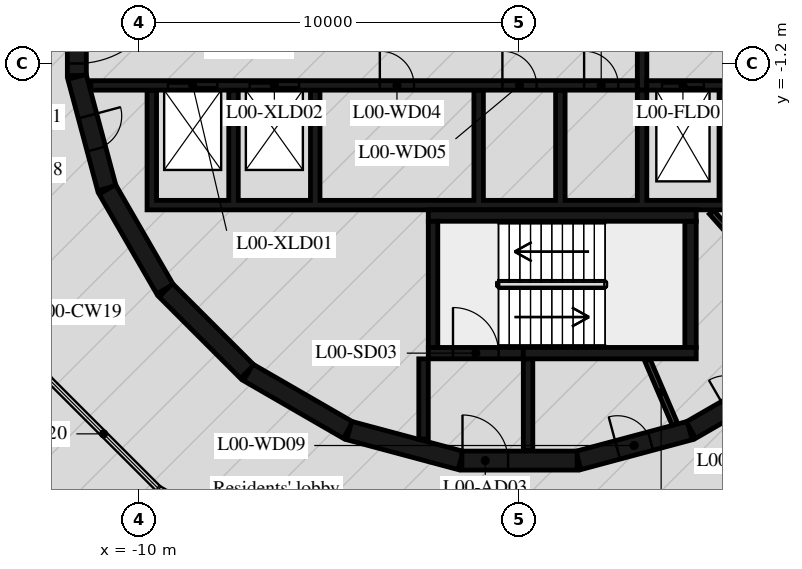
"""IFC4 building model, lengths in metres.
Left out: names, types, materials, properties, quantities, classifications, styles, units other than length and angle.
Written with IfcOpenShell. Run it as: python <this file> out.ifc"""

import sys

from ifc_helpers import new_model, si_unit, direction, frame, frame_2d, origin, place, context, subcontext, project, spatial, polyline, rectangle, outline, extrude, element, fill, save


model = new_model("IFC4")
c1 = context("Model", 3, precision=1e-05, world=origin(), true_north=direction((0.0, 1.0)))
c2 = subcontext(c1, "Body", "Model", "MODEL_VIEW")
j1 = project(units=[si_unit("LENGTHUNIT", "METRE"), si_unit("PLANEANGLEUNIT", "RADIAN")], contexts=[c1])
p1 = place(None, origin())
s1 = spatial("IfcSite", under=j1, at=p1, CompositionType="ELEMENT")
p2 = place(p1, origin())
s2 = spatial("IfcBuilding", under=s1, at=p2, CompositionType="ELEMENT")
p3 = place(p2, origin())
s3 = spatial("IfcBuildingStorey", under=s2, at=p3, CompositionType="ELEMENT", Elevation=0.0)
p4 = place(p3, frame((1.55, -11.643, 0.0), z_axis=(0.0, 0.0, 1.0), x_axis=(0.965948410781, 0.258734743916, 0.0)))
e1 = element("IfcWall", 1, at=p4, inside=s3, PredefinedType="SHEAR", context=c2, shape_type="SweptSolid", body=[
    extrude(rectangle(XDim=3.033, YDim=0.5, at=frame_2d((1.516, 0.0))), origin(), (0.0, 0.0, 1.0), 8.62),
])
p5 = place(p4, frame((1.066, 0.0, 0.0)))
e2 = element("IfcOpeningElement", 2, at=p5, cuts=e1, PredefinedType="OPENING", context=c2, shape_type="SweptSolid", body=[
    extrude(rectangle(XDim=0.9, YDim=2.1, at=frame_2d((0.45, 1.05))), frame((0.0, 0.26, 0.0), z_axis=(0.0, -1.0, 0.0), x_axis=(1.0, 0.0, 0.0)), (0.0, 0.0, 1.0), 0.52),
])
p6 = place(p3, frame((4.51, -10.845, 0.0), z_axis=(0.0, 0.0, 1.0), x_axis=(0.865975092491, 0.500087131594, 0.0)))
e3 = element("IfcWall", 3, at=p6, inside=s3, PredefinedType="SHEAR", context=c2, shape_type="SweptSolid", body=[
    extrude(rectangle(XDim=3.033, YDim=0.5, at=frame_2d((1.516, 0.0))), origin(), (0.0, 0.0, 1.0), 8.62),
])
p7 = place(p6, frame((1.066, 0.0, 0.0)))
e4 = element("IfcOpeningElement", 4, at=p7, cuts=e3, PredefinedType="OPENING", context=c2, shape_type="SweptSolid", body=[
    extrude(rectangle(XDim=0.9, YDim=2.1, at=frame_2d((0.45, 1.05))), frame((0.0, 0.26, 0.0), z_axis=(0.0, -1.0, 0.0), x_axis=(1.0, 0.0, 0.0)), (0.0, 0.0, 1.0), 0.52),
])
p8 = place(p3, frame((-11.647, 1.516, 0.0), z_axis=(0.0, 0.0, 1.0), x_axis=(0.0, -1.0, 0.0)))
e5 = element("IfcWall", 5, at=p8, inside=s3, PredefinedType="SHEAR", context=c2, shape_type="SweptSolid", body=[
    extrude(rectangle(XDim=3.033, YDim=0.5, at=frame_2d((1.516, 0.0))), origin(), (0.0, 0.0, 1.0), 8.62),
])
p9 = place(p8, frame((0.316, 0.0, 0.0)))
e6 = element("IfcOpeningElement", 6, at=p9, cuts=e5, PredefinedType="OPENING", context=c2, shape_type="SweptSolid", body=[
    extrude(rectangle(XDim=2.4, YDim=2.1, at=frame_2d((1.2, 1.05))), frame((0.0, 0.26, 0.0), z_axis=(0.0, -1.0, 0.0), x_axis=(1.0, 0.0, 0.0)), (0.0, 0.0, 1.0), 0.52),
])
p10 = place(p3, frame((-11.643, -1.55, 0.0), z_axis=(0.0, 0.0, 1.0), x_axis=(0.258734743916, -0.965948410781, 0.0)))
e7 = element("IfcWall", 7, at=p10, inside=s3, PredefinedType="SHEAR", context=c2, shape_type="SweptSolid", body=[
    extrude(rectangle(XDim=3.033, YDim=0.5, at=frame_2d((1.516, 0.0))), origin(), (0.0, 0.0, 1.0), 8.62),
])
p11 = place(p10, frame((1.066, 0.0, 0.0)))
e8 = element("IfcOpeningElement", 8, at=p11, cuts=e7, PredefinedType="OPENING", context=c2, shape_type="SweptSolid", body=[
    extrude(rectangle(XDim=0.9, YDim=2.1, at=frame_2d((0.45, 1.05))), frame((0.0, 0.26, 0.0), z_axis=(0.0, -1.0, 0.0), x_axis=(1.0, 0.0, 0.0)), (0.0, 0.0, 1.0), 0.52),
])
p12 = place(p3, frame((-10.845, -4.51, 0.0), z_axis=(0.0, 0.0, 1.0), x_axis=(0.500087131594, -0.865975092491, 0.0)))
e9 = element("IfcWall", 9, at=p12, inside=s3, PredefinedType="SHEAR", context=c2, shape_type="SweptSolid", body=[
    extrude(rectangle(XDim=3.033, YDim=0.5, at=frame_2d((1.516, 0.0))), origin(), (0.0, 0.0, 1.0), 8.62),
])
p13 = place(p3, frame((-9.308, -7.164, 0.0), z_axis=(0.0, 0.0, 1.0), x_axis=(0.707106781187, -0.707106781187, 0.0)))
e10 = element("IfcWall", 10, at=p13, inside=s3, PredefinedType="SHEAR", context=c2, shape_type="SweptSolid", body=[
    extrude(rectangle(XDim=3.032, YDim=0.5, at=frame_2d((1.516, 0.0))), origin(), (0.0, 0.0, 1.0), 8.62),
])
for number, where, z_axis, x_axis in (
    (11, (-7.137, -9.329, 0.0), (0.0, 0.0, 1.0), (0.866, -0.5, 0.0)),
    (12, (-4.479, -10.858, 0.0), (0.0, 0.0, 1.0), (0.966, -0.259, 0.0)),
):
    element("IfcWall", number, at=place(p3, frame(where, z_axis=z_axis, x_axis=x_axis)), inside=s3, PredefinedType="SHEAR", context=c2, shape_type="SweptSolid", body=[
        extrude(rectangle(XDim=3.033, YDim=0.5, at=frame_2d((1.516, 0.0))), origin(), (0.0, 0.0, 1.0), 8.62),
    ])
p14 = place(p3, frame((-1.516, -11.647, 0.0), z_axis=(0.0, 0.0, 1.0), x_axis=(1.0, 0.0, 0.0)))
e13 = element("IfcWall", 13, at=p14, inside=s3, PredefinedType="SHEAR", context=c2, shape_type="SweptSolid", body=[
    extrude(rectangle(XDim=3.033, YDim=0.5, at=frame_2d((1.516, 0.0))), origin(), (0.0, 0.0, 1.0), 8.62),
])
p15 = place(p14, frame((0.016, 0.0, 0.0)))
e14 = element("IfcOpeningElement", 14, at=p15, cuts=e13, PredefinedType="OPENING", context=c2, shape_type="SweptSolid", body=[
    extrude(rectangle(XDim=1.2, YDim=2.1, at=frame_2d((0.6, 1.05))), frame((0.0, 0.26, 0.0), z_axis=(0.0, -1.0, 0.0), x_axis=(1.0, 0.0, 0.0)), (0.0, 0.0, 1.0), 0.52),
])
p16 = place(p3, frame((-2.275, -8.67, 0.0), z_axis=(0.0, 0.0, 1.0), x_axis=(0.0, 1.0, 0.0)))
e15 = element("IfcWall", 15, at=p16, inside=s3, PredefinedType="SHEAR", context=c2, shape_type="SweptSolid", body=[
    extrude(rectangle(XDim=3.32, YDim=0.25, at=frame_2d((1.66, 0.0))), origin(), (0.0, 0.0, 1.0), 8.62),
])
p17 = place(p3, frame((-2.4, -5.2, 0.0), z_axis=(0.0, 0.0, 1.0), x_axis=(1.0, 0.0, 0.0)))
e16 = element("IfcWall", 16, at=p17, inside=s3, PredefinedType="SHEAR", context=c2, shape_type="SweptSolid", body=[
    extrude(rectangle(XDim=7.05, YDim=0.3, at=frame_2d((3.525, 0.0))), origin(), (0.0, 0.0, 1.0), 8.62),
])
p18 = place(p3, frame((4.5, -8.67, 0.0), z_axis=(0.0, 0.0, 1.0), x_axis=(0.0, 1.0, 0.0)))
e17 = element("IfcWall", 17, at=p18, inside=s3, PredefinedType="SHEAR", context=c2, shape_type="SweptSolid", body=[
    extrude(rectangle(XDim=3.32, YDim=0.3, at=frame_2d((1.66, 0.0))), origin(), (0.0, 0.0, 1.0), 8.62),
])
p19 = place(p3, frame((0.1, -8.82, 0.0), z_axis=(0.0, 0.0, 1.0), x_axis=(1.0, 0.0, 0.0)))
e18 = element("IfcWall", 18, at=p19, inside=s3, PredefinedType="SHEAR", context=c2, shape_type="SweptSolid", body=[
    extrude(rectangle(XDim=4.55, YDim=0.3, at=frame_2d((2.275, 0.0))), origin(), (0.0, 0.0, 1.0), 8.62),
])
p20 = place(p3, frame((-2.4, -8.82, 0.0), z_axis=(0.0, 0.0, 1.0), x_axis=(1.0, 0.0, 0.0)))
e19 = element("IfcWall", 19, at=p20, inside=s3, PredefinedType="SHEAR", context=c2, shape_type="SweptSolid", body=[
    extrude(rectangle(XDim=2.5, YDim=0.3, at=frame_2d((1.25, 0.0))), origin(), (0.0, 0.0, 1.0), 8.62),
])
p21 = place(p20, frame((0.65, 0.0, 0.0)))
e20 = element("IfcOpeningElement", 20, at=p21, cuts=e19, PredefinedType="OPENING", context=c2, shape_type="SweptSolid", body=[
    extrude(rectangle(XDim=1.2, YDim=2.1, at=frame_2d((0.6, 1.05))), frame((0.0, 0.16, 0.0), z_axis=(0.0, -1.0, 0.0), x_axis=(1.0, 0.0, 0.0)), (0.0, 0.0, 1.0), 0.32),
])
p22 = place(p3, frame((-2.525, -8.97, 0.0), z_axis=(0.0, 0.0, 1.0), x_axis=(0.0, -1.0, 0.0)))
e21 = element("IfcWall", 21, at=p22, inside=s3, PredefinedType="SHEAR", context=c2, shape_type="SweptSolid", body=[
    extrude(rectangle(XDim=2.11, YDim=0.25, at=frame_2d((1.055, 0.0))), origin(), (0.0, 0.0, 1.0), 8.62),
])
p23 = place(p3, frame((0.225, -8.97, 0.0), z_axis=(0.0, 0.0, 1.0), x_axis=(0.0, -1.0, 0.0)))
e22 = element("IfcWall", 22, at=p23, inside=s3, PredefinedType="SHEAR", context=c2, shape_type="SweptSolid", body=[
    extrude(rectangle(XDim=2.41, YDim=0.25, at=frame_2d((1.205, 0.0))), origin(), (0.0, 0.0, 1.0), 8.62),
])
p24 = place(p3, origin())
e23 = element("IfcWall", 23, at=p24, inside=s3, PredefinedType="SHEAR", context=c2, shape_type="SweptSolid", body=[
    extrude(outline(polyline([(9.8, -5.05), (9.8, -4.8), (9.8, -1.9), (9.55, -1.9), (9.55, -4.8), (7.65, -4.8), (7.65, -1.9), (7.4, -1.9), (7.4, -4.8), (5.5, -4.8), (5.5, -1.9), (5.25, -1.9), (5.25, -4.8), (3.35, -4.8), (3.35, -1.9), (3.1, -1.9), (3.1, -4.8), (1.2, -4.8), (1.2, -1.9), (0.95, -1.9), (0.95, -4.8), (-0.95, -4.8), (-0.95, -1.9), (-1.2, -1.9), (-1.2, -4.8), (-5.25, -4.8), (-5.25, -1.9), (-5.5, -1.9), (-5.5, -4.8), (-7.4, -4.8), (-7.4, -1.9), (-7.65, -1.9), (-7.65, -4.8), (-9.55, -4.8), (-9.55, -1.9), (-9.8, -1.9), (-9.8, -4.8), (-9.8, -5.05), (9.8, -5.05)])), origin(), (0.0, 0.0, 1.0), 8.62),
])
p25 = place(p3, frame((-11.28, -1.775, 0.0), z_axis=(0.0, 0.0, 1.0), x_axis=(1.0, 0.0, 0.0)))
e24 = element("IfcWall", 24, at=p25, inside=s3, PredefinedType="SHEAR", context=c2, shape_type="SweptSolid", body=[
    extrude(rectangle(XDim=14.38, YDim=0.25, at=frame_2d((7.19, 0.0))), origin(), (0.0, 0.0, 1.0), 8.62),
])
p26 = place(p25, frame((2.03, 0.0, 0.0)))
e25 = element("IfcOpeningElement", 25, at=p26, cuts=e24, PredefinedType="OPENING", context=c2, shape_type="SweptSolid", body=[
    extrude(rectangle(XDim=1.3, YDim=2.1, at=frame_2d((0.65, 1.05))), frame((0.0, 0.135, 0.0), z_axis=(0.0, -1.0, 0.0), x_axis=(1.0, 0.0, 0.0)), (0.0, 0.0, 1.0), 0.27),
])
p27 = place(p25, frame((4.18, 0.0, 0.0)))
e26 = element("IfcOpeningElement", 26, at=p27, cuts=e24, PredefinedType="OPENING", context=c2, shape_type="SweptSolid", body=[
    extrude(rectangle(XDim=1.3, YDim=2.1, at=frame_2d((0.65, 1.05))), frame((0.0, 0.135, 0.0), z_axis=(0.0, -1.0, 0.0), x_axis=(1.0, 0.0, 0.0)), (0.0, 0.0, 1.0), 0.27),
])
p28 = place(p25, frame((7.605, 0.0, 0.0)))
e27 = element("IfcOpeningElement", 27, at=p28, cuts=e24, PredefinedType="OPENING", context=c2, shape_type="SweptSolid", body=[
    extrude(rectangle(XDim=0.9, YDim=2.1, at=frame_2d((0.45, 1.05))), frame((0.0, 0.135, 0.0), z_axis=(0.0, -1.0, 0.0), x_axis=(1.0, 0.0, 0.0)), (0.0, 0.0, 1.0), 0.27),
])
p29 = place(p25, frame((10.83, 0.0, 0.0)))
e28 = element("IfcOpeningElement", 28, at=p29, cuts=e24, PredefinedType="OPENING", context=c2, shape_type="SweptSolid", body=[
    extrude(rectangle(XDim=0.9, YDim=2.1, at=frame_2d((0.45, 1.05))), frame((0.0, 0.135, 0.0), z_axis=(0.0, -1.0, 0.0), x_axis=(1.0, 0.0, 0.0)), (0.0, 0.0, 1.0), 0.27),
])
p30 = place(p25, frame((12.98, 0.0, 0.0)))
e29 = element("IfcOpeningElement", 29, at=p30, cuts=e24, PredefinedType="OPENING", context=c2, shape_type="SweptSolid", body=[
    extrude(rectangle(XDim=0.9, YDim=2.1, at=frame_2d((0.45, 1.05))), frame((0.0, 0.135, 0.0), z_axis=(0.0, -1.0, 0.0), x_axis=(1.0, 0.0, 0.0)), (0.0, 0.0, 1.0), 0.27),
])
p31 = place(p3, frame((3.35, -1.775, 0.0), z_axis=(0.0, 0.0, 1.0), x_axis=(1.0, 0.0, 0.0)))
e30 = element("IfcWall", 30, at=p31, inside=s3, PredefinedType="SHEAR", context=c2, shape_type="SweptSolid", body=[
    extrude(rectangle(XDim=7.93, YDim=0.25, at=frame_2d((3.965, 0.0))), origin(), (0.0, 0.0, 1.0), 8.62),
])
p32 = place(p31, frame((0.4, 0.0, 0.0)))
e31 = element("IfcOpeningElement", 31, at=p32, cuts=e30, PredefinedType="OPENING", context=c2, shape_type="SweptSolid", body=[
    extrude(rectangle(XDim=1.1, YDim=2.4, at=frame_2d((0.55, 1.2))), frame((0.0, 0.135, 0.0), z_axis=(0.0, -1.0, 0.0), x_axis=(1.0, 0.0, 0.0)), (0.0, 0.0, 1.0), 0.27),
])
p33 = place(p31, frame((2.55, 0.0, 0.0)))
e32 = element("IfcOpeningElement", 32, at=p33, cuts=e30, PredefinedType="OPENING", context=c2, shape_type="SweptSolid", body=[
    extrude(rectangle(XDim=1.1, YDim=2.4, at=frame_2d((0.55, 1.2))), frame((0.0, 0.135, 0.0), z_axis=(0.0, -1.0, 0.0), x_axis=(1.0, 0.0, 0.0)), (0.0, 0.0, 1.0), 0.27),
])
p34 = place(p31, frame((4.7, 0.0, 0.0)))
e33 = element("IfcOpeningElement", 33, at=p34, cuts=e30, PredefinedType="OPENING", context=c2, shape_type="SweptSolid", body=[
    extrude(rectangle(XDim=1.1, YDim=2.4, at=frame_2d((0.55, 1.2))), frame((0.0, 0.135, 0.0), z_axis=(0.0, -1.0, 0.0), x_axis=(1.0, 0.0, 0.0)), (0.0, 0.0, 1.0), 0.27),
])
p35 = place(p3, frame((3.225, -1.9, 0.0), z_axis=(0.0, 0.0, 1.0), x_axis=(0.0, 1.0, 0.0)))
e34 = element("IfcWall", 34, at=p35, inside=s3, PredefinedType="SHEAR", context=c2, shape_type="SweptSolid", body=[
    extrude(rectangle(XDim=3.8, YDim=0.25, at=frame_2d((1.9, 0.0))), origin(), (0.0, 0.0, 1.0), 8.62),
])
p36 = place(p3, frame((7.842, -8.248, 0.0), z_axis=(0.0, 0.0, 1.0), x_axis=(-0.66446128181, 0.747322691329, 0.0)))
e35 = element("IfcWall", 35, at=p36, inside=s3, PredefinedType="PARTITIONING", context=c2, shape_type="SweptSolid", body=[
    extrude(rectangle(XDim=4.198, YDim=0.15, at=frame_2d((2.099, 0.0))), origin(), (0.0, 0.0, 1.0), 8.62),
])
p37 = place(p3, frame((3.367, -9.007, 0.0), z_axis=(0.0, 0.0, 1.0), x_axis=(0.394387482265, -0.918944238696, 0.0)))
e36 = element("IfcWall", 36, at=p37, inside=s3, PredefinedType="PARTITIONING", context=c2, shape_type="SweptSolid", body=[
    extrude(rectangle(XDim=1.825, YDim=0.15, at=frame_2d((0.913, 0.0))), origin(), (0.0, 0.0, 1.0), 8.62),
])
p38 = place(p3, frame((-15.049, -11.671, 0.0), z_axis=(0.0, 0.0, 1.0), x_axis=(0.707081756616, -0.707131804872, 0.0)))
e37 = element("IfcWall", 37, at=p38, inside=s3, PredefinedType="PARTITIONING", context=c2, shape_type="SweptSolid", body=[
    extrude(rectangle(XDim=4.878, YDim=0.2, at=frame_2d((2.439, 0.0))), origin(), (0.0, 0.0, 1.0), 8.62),
])
p39 = place(p21, origin())
e38 = element("IfcDoor", 38, at=p39, inside=s3, OperationType="SINGLE_SWING_LEFT", PredefinedType="DOOR", context=c2, shape_type="SweptSolid", body=[
    extrude(rectangle(XDim=1.2, YDim=2.1, at=frame_2d((0.6, 1.05))), frame((0.0, 0.025, 0.0), z_axis=(0.0, -1.0, 0.0), x_axis=(1.0, 0.0, 0.0)), (0.0, 0.0, 1.0), 0.05),
])
fill(e20, e38)
p40 = place(p15, origin())
e39 = element("IfcDoor", 39, at=p40, inside=s3, OperationType="SINGLE_SWING_RIGHT", PredefinedType="DOOR", context=c2, shape_type="SweptSolid", body=[
    extrude(rectangle(XDim=1.2, YDim=2.1, at=frame_2d((0.6, 1.05))), frame((0.0, 0.025, 0.0), z_axis=(0.0, -1.0, 0.0), x_axis=(1.0, 0.0, 0.0)), (0.0, 0.0, 1.0), 0.05),
])
fill(e14, e39)
p41 = place(p9, origin())
e40 = element("IfcDoor", 40, at=p41, inside=s3, OperationType="DOUBLE_DOOR_SINGLE_SWING", PredefinedType="DOOR", context=c2, shape_type="SweptSolid", body=[
    extrude(rectangle(XDim=2.4, YDim=2.1, at=frame_2d((1.2, 1.05))), frame((0.0, 0.025, 0.0), z_axis=(0.0, -1.0, 0.0), x_axis=(1.0, 0.0, 0.0)), (0.0, 0.0, 1.0), 0.05),
])
fill(e6, e40)
p42 = place(p26, origin())
e41 = element("IfcDoor", 41, at=p42, inside=s3, OperationType="DOUBLE_DOOR_SLIDING", PredefinedType="DOOR", context=c2, shape_type="SweptSolid", body=[
    extrude(rectangle(XDim=1.3, YDim=2.1, at=frame_2d((0.65, 1.05))), frame((0.0, 0.025, 0.0), z_axis=(0.0, -1.0, 0.0), x_axis=(1.0, 0.0, 0.0)), (0.0, 0.0, 1.0), 0.05),
])
fill(e25, e41)
p43 = place(p27, origin())
e42 = element("IfcDoor", 42, at=p43, inside=s3, OperationType="DOUBLE_DOOR_SLIDING", PredefinedType="DOOR", context=c2, shape_type="SweptSolid", body=[
    extrude(rectangle(XDim=1.3, YDim=2.1, at=frame_2d((0.65, 1.05))), frame((0.0, 0.025, 0.0), z_axis=(0.0, -1.0, 0.0), x_axis=(1.0, 0.0, 0.0)), (0.0, 0.0, 1.0), 0.05),
])
fill(e26, e42)
p44 = place(p32, origin())
e43 = element("IfcDoor", 43, at=p44, inside=s3, OperationType="DOUBLE_DOOR_SLIDING", PredefinedType="DOOR", context=c2, shape_type="SweptSolid", body=[
    extrude(rectangle(XDim=1.1, YDim=2.4, at=frame_2d((0.55, 1.2))), frame((0.0, 0.025, 0.0), z_axis=(0.0, -1.0, 0.0), x_axis=(1.0, 0.0, 0.0)), (0.0, 0.0, 1.0), 0.05),
])
fill(e31, e43)
p45 = place(p28, origin())
e44 = element("IfcDoor", 44, at=p45, inside=s3, OperationType="SINGLE_SWING_LEFT", PredefinedType="DOOR", context=c2, shape_type="SweptSolid", body=[
    extrude(rectangle(XDim=0.9, YDim=2.1, at=frame_2d((0.45, 1.05))), frame((0.0, 0.025, 0.0), z_axis=(0.0, -1.0, 0.0), x_axis=(1.0, 0.0, 0.0)), (0.0, 0.0, 1.0), 0.05),
])
fill(e27, e44)
p46 = place(p29, origin())
e45 = element("IfcDoor", 45, at=p46, inside=s3, OperationType="SINGLE_SWING_RIGHT", PredefinedType="DOOR", context=c2, shape_type="SweptSolid", body=[
    extrude(rectangle(XDim=0.9, YDim=2.1, at=frame_2d((0.45, 1.05))), frame((0.0, 0.025, 0.0), z_axis=(0.0, -1.0, 0.0), x_axis=(1.0, 0.0, 0.0)), (0.0, 0.0, 1.0), 0.05),
])
fill(e28, e45)
p47 = place(p30, origin())
e46 = element("IfcDoor", 46, at=p47, inside=s3, OperationType="SINGLE_SWING_LEFT", PredefinedType="DOOR", context=c2, shape_type="SweptSolid", body=[
    extrude(rectangle(XDim=0.9, YDim=2.1, at=frame_2d((0.45, 1.05))), frame((0.0, 0.025, 0.0), z_axis=(0.0, -1.0, 0.0), x_axis=(1.0, 0.0, 0.0)), (0.0, 0.0, 1.0), 0.05),
])
fill(e29, e46)
p48 = place(p5, origin())
e47 = element("IfcDoor", 47, at=p48, inside=s3, OperationType="SINGLE_SWING_RIGHT", PredefinedType="DOOR", context=c2, shape_type="SweptSolid", body=[
    extrude(rectangle(XDim=0.9, YDim=2.1, at=frame_2d((0.45, 1.05))), frame((0.0, 0.025, 0.0), z_axis=(0.0, -1.0, 0.0), x_axis=(1.0, 0.0, 0.0)), (0.0, 0.0, 1.0), 0.05),
])
fill(e2, e47)
p49 = place(p11, origin())
e48 = element("IfcDoor", 48, at=p49, inside=s3, OperationType="SINGLE_SWING_RIGHT", PredefinedType="DOOR", context=c2, shape_type="SweptSolid", body=[
    extrude(rectangle(XDim=0.9, YDim=2.1, at=frame_2d((0.45, 1.05))), frame((0.0, 0.025, 0.0), z_axis=(0.0, -1.0, 0.0), x_axis=(1.0, 0.0, 0.0)), (0.0, 0.0, 1.0), 0.05),
])
fill(e8, e48)
save(model, sys.argv[1])
